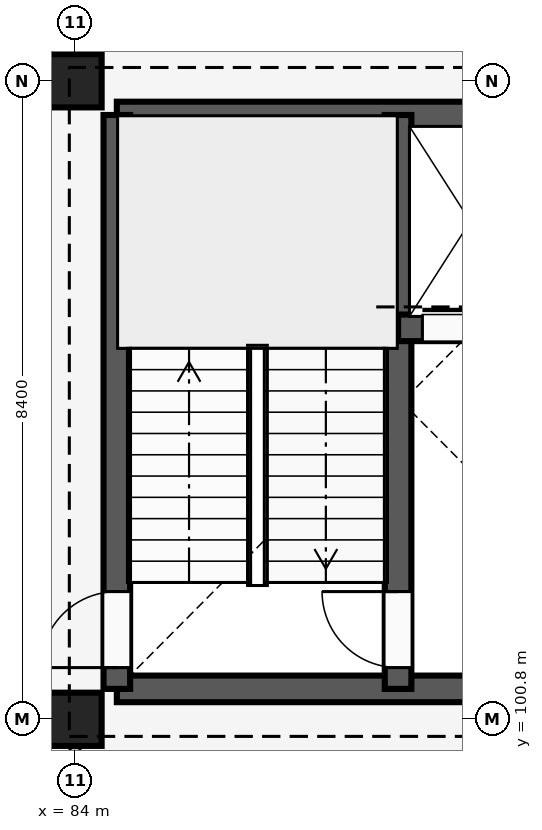
"""IFC4 building model, lengths in metres.
Left out: names, types, materials, properties, quantities, classifications, styles, units other than length and angle.
Written with IfcOpenShell. Run it as: python <this file> out.ifc"""

import sys

from ifc_helpers import new_model, si_unit, direction, frame, frame_2d, origin, origin_2d, place, context, subcontext, project, spatial, rectangle, extrude, element, fill, save


model = new_model("IFC4")
c1 = context("Model", 3, precision=1e-05, world=origin(), true_north=direction((0.0, 1.0)))
c2 = subcontext(c1, "Body", "Model", "MODEL_VIEW")
j1 = project(units=[si_unit("LENGTHUNIT", "METRE"), si_unit("PLANEANGLEUNIT", "RADIAN")], contexts=[c1])
p1 = place(None, origin())
s1 = spatial("IfcSite", under=j1, at=p1, CompositionType="ELEMENT")
p2 = place(p1, origin())
s2 = spatial("IfcBuilding", under=s1, at=p2, CompositionType="ELEMENT")
p3 = place(p2, frame((0.0, 0.0, 16.2)))
s3 = spatial("IfcBuildingStorey", under=s2, at=p3, CompositionType="ELEMENT", Elevation=16.2)
for number, where, z_axis, x_axis in (
    (1, (84.0, 100.8, 0.0), (0.0, 0.0, 1.0), (1.0, 0.0, 0.0)),
    (2, (84.0, 109.2, 0.0), (0.0, 0.0, 1.0), (1.0, 0.0, 0.0)),
):
    element("IfcColumn", number, at=place(p3, frame(where, z_axis=z_axis, x_axis=x_axis)), inside=s3, PredefinedType="COLUMN", context=c2, shape_type="SweptSolid", body=[
        extrude(rectangle(XDim=0.7, YDim=0.7, at=origin_2d()), origin(), (0.0, 0.0, 1.0), 4.2),
    ])
p4 = place(p3, frame((84.55, 101.2, 0.0), z_axis=(0.0, 0.0, 1.0), x_axis=(1.0, 0.0, 0.0)))
e3 = element("IfcWall", 3, at=p4, inside=s3, PredefinedType="SHEAR", context=c2, shape_type="SweptSolid", body=[
    extrude(rectangle(XDim=7.5, YDim=0.35, at=frame_2d((3.75, 0.0))), origin(), (0.0, 0.0, 1.0), 3.92),
])
p5 = place(p4, frame((4.85, 0.0, 0.0)))
e4 = element("IfcOpeningElement", 4, at=p5, cuts=e3, PredefinedType="OPENING", context=c2, shape_type="SweptSolid", body=[
    extrude(rectangle(XDim=1.2, YDim=2.2, at=frame_2d((0.6, 1.1))), frame((0.0, 0.185, 0.0), z_axis=(0.0, -1.0, 0.0), x_axis=(1.0, 0.0, 0.0)), (0.0, 0.0, 1.0), 0.37),
])
p6 = place(p3, frame((84.55, 108.75, 0.0), z_axis=(0.0, 0.0, 1.0), x_axis=(1.0, 0.0, 0.0)))
e5 = element("IfcWall", 5, at=p6, inside=s3, PredefinedType="SHEAR", context=c2, shape_type="SweptSolid", body=[
    extrude(rectangle(XDim=7.5, YDim=0.35, at=frame_2d((3.75, 0.0))), origin(), (0.0, 0.0, 1.0), 3.92),
])
p7 = place(p3, frame((84.55, 101.2, 0.0), z_axis=(0.0, 0.0, 1.0), x_axis=(0.0, 1.0, 0.0)))
e6 = element("IfcWall", 6, at=p7, inside=s3, PredefinedType="SHEAR", context=c2, shape_type="SweptSolid", body=[
    extrude(rectangle(XDim=7.55, YDim=0.35, at=frame_2d((3.775, 0.0))), origin(), (0.0, 0.0, 1.0), 3.92),
])
p8 = place(p7, frame((0.28, 0.0, 0.0)))
e7 = element("IfcOpeningElement", 7, at=p8, cuts=e6, PredefinedType="OPENING", context=c2, shape_type="SweptSolid", body=[
    extrude(rectangle(XDim=1.0, YDim=2.15, at=frame_2d((0.5, 1.075))), frame((0.0, 0.185, 0.0), z_axis=(0.0, -1.0, 0.0), x_axis=(1.0, 0.0, 0.0)), (0.0, 0.0, 1.0), 0.37),
])
p9 = place(p3, frame((88.25, 101.2, 0.0), z_axis=(0.0, 0.0, 1.0), x_axis=(0.0, 1.0, 0.0)))
e8 = element("IfcWall", 8, at=p9, inside=s3, PredefinedType="SHEAR", context=c2, shape_type="SweptSolid", body=[
    extrude(rectangle(XDim=7.55, YDim=0.35, at=frame_2d((3.775, 0.0))), origin(), (0.0, 0.0, 1.0), 3.92),
])
p10 = place(p9, frame((0.28, 0.0, 0.0)))
e9 = element("IfcOpeningElement", 9, at=p10, cuts=e8, PredefinedType="OPENING", context=c2, shape_type="SweptSolid", body=[
    extrude(rectangle(XDim=1.0, YDim=2.15, at=frame_2d((0.5, 1.075))), frame((0.0, 0.185, 0.0), z_axis=(0.0, -1.0, 0.0), x_axis=(1.0, 0.0, 0.0)), (0.0, 0.0, 1.0), 0.37),
])
p11 = place(p3, frame((88.25, 105.95, 0.0), z_axis=(0.0, 0.0, 1.0), x_axis=(1.0, 0.0, 0.0)))
e10 = element("IfcWall", 10, at=p11, inside=s3, PredefinedType="SHEAR", context=c2, shape_type="SweptSolid", body=[
    extrude(rectangle(XDim=3.8, YDim=0.35, at=frame_2d((1.9, 0.0))), origin(), (0.0, 0.0, 1.0), 3.92),
])
p12 = place(p11, frame((0.32, 0.0, 0.0)))
e11 = element("IfcOpeningElement", 11, at=p12, cuts=e10, PredefinedType="OPENING", context=c2, shape_type="SweptSolid", body=[
    extrude(rectangle(XDim=1.35, YDim=2.25, at=frame_2d((0.675, 1.125))), frame((0.0, 0.185, 0.0), z_axis=(0.0, -1.0, 0.0), x_axis=(1.0, 0.0, 0.0)), (0.0, 0.0, 1.0), 0.37),
])
p13 = place(p11, frame((2.04, 0.0, 0.0)))
e12 = element("IfcOpeningElement", 12, at=p13, cuts=e10, PredefinedType="OPENING", context=c2, shape_type="SweptSolid", body=[
    extrude(rectangle(XDim=1.4, YDim=2.25, at=frame_2d((0.7, 1.125))), frame((0.0, 0.185, 0.0), z_axis=(0.0, -1.0, 0.0), x_axis=(1.0, 0.0, 0.0)), (0.0, 0.0, 1.0), 0.37),
])
p14 = place(p3, frame((84.0, 92.54, 0.0), z_axis=(0.0, 0.0, 1.0), x_axis=(0.0, 1.0, 0.0)))
e13 = element("IfcWall", 13, at=p14, inside=s3, PredefinedType="PARTITIONING", context=c2, shape_type="SweptSolid", body=[
    extrude(rectangle(XDim=8.21, YDim=0.13, at=frame_2d((4.105, 0.0))), origin(), (0.0, 0.0, 1.0), 3.3),
])
p15 = place(p14, frame((3.64, 0.0, 0.0)))
e14 = element("IfcOpeningElement", 14, at=p15, cuts=e13, PredefinedType="OPENING", context=c2, shape_type="SweptSolid", body=[
    extrude(rectangle(XDim=1.08, YDim=2.15, at=frame_2d((0.54, 1.075))), frame((0.0, 0.075, 0.0), z_axis=(0.0, -1.0, 0.0), x_axis=(1.0, 0.0, 0.0)), (0.0, 0.0, 1.0), 0.15),
])
p16 = place(p3, frame((84.0, 109.55, 0.0), z_axis=(0.0, 0.0, 1.0), x_axis=(0.0, 1.0, 0.0)))
e15 = element("IfcWall", 15, at=p16, inside=s3, PredefinedType="PARTITIONING", context=c2, shape_type="SweptSolid", body=[
    extrude(rectangle(XDim=7.91, YDim=0.13, at=frame_2d((3.955, 0.0))), origin(), (0.0, 0.0, 1.0), 3.3),
])
p17 = place(p16, frame((3.4, 0.0, 0.0)))
e16 = element("IfcOpeningElement", 16, at=p17, cuts=e15, PredefinedType="OPENING", context=c2, shape_type="SweptSolid", body=[
    extrude(rectangle(XDim=1.05, YDim=2.2, at=frame_2d((0.525, 1.1))), frame((0.0, 0.075, 0.0), z_axis=(0.0, -1.0, 0.0), x_axis=(1.0, 0.0, 0.0)), (0.0, 0.0, 1.0), 0.15),
])
p18 = place(p8, origin())
e17 = element("IfcDoor", 17, at=p18, inside=s3, OperationType="SINGLE_SWING_LEFT", PredefinedType="DOOR", context=c2, shape_type="SweptSolid", body=[
    extrude(rectangle(XDim=1.0, YDim=2.15, at=frame_2d((0.5, 1.075))), frame((0.0, 0.025, 0.0), z_axis=(0.0, -1.0, 0.0), x_axis=(1.0, 0.0, 0.0)), (0.0, 0.0, 1.0), 0.05),
])
fill(e7, e17)
p19 = place(p10, origin())
e18 = element("IfcDoor", 18, at=p19, inside=s3, OperationType="SINGLE_SWING_RIGHT", PredefinedType="DOOR", context=c2, shape_type="SweptSolid", body=[
    extrude(rectangle(XDim=1.0, YDim=2.15, at=frame_2d((0.5, 1.075))), frame((0.0, 0.025, 0.0), z_axis=(0.0, -1.0, 0.0), x_axis=(1.0, 0.0, 0.0)), (0.0, 0.0, 1.0), 0.05),
])
fill(e9, e18)
p20 = place(p12, origin())
e19 = element("IfcDoor", 19, at=p20, inside=s3, OperationType="SLIDING_TO_LEFT", PredefinedType="DOOR", context=c2, shape_type="SweptSolid", body=[
    extrude(rectangle(XDim=1.35, YDim=2.25, at=frame_2d((0.675, 1.125))), frame((0.0, 0.025, 0.0), z_axis=(0.0, -1.0, 0.0), x_axis=(1.0, 0.0, 0.0)), (0.0, 0.0, 1.0), 0.05),
])
fill(e11, e19)
save(model, sys.argv[1])
